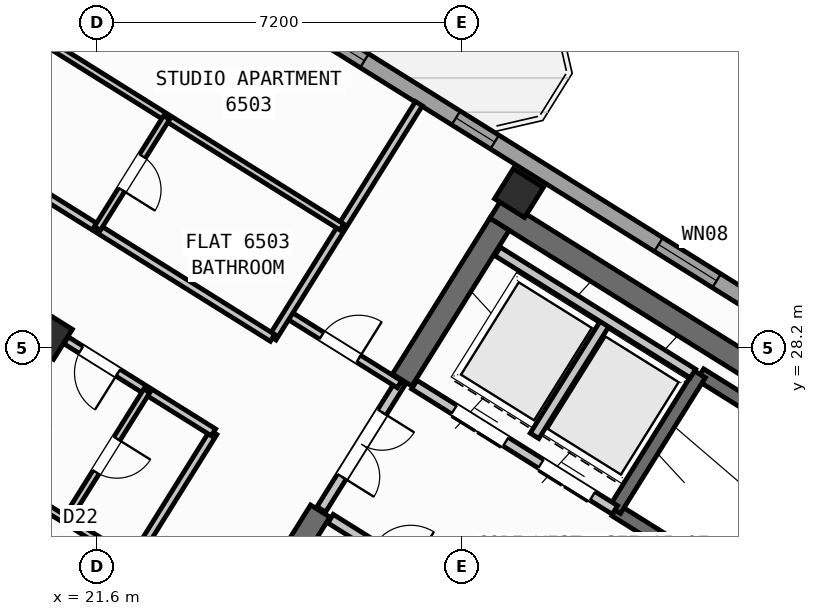
"""IFC4 building model, lengths in metres.
Left out: names, types, materials, properties, quantities, classifications, styles, units other than length and angle.
Written with IfcOpenShell. Run it as: python <this file> out.ifc"""

import sys

from ifc_helpers import new_model, si_unit, direction, frame, frame_2d, origin, origin_2d, place, context, subcontext, project, spatial, rectangle, hollow_rectangle, extrude, source, transform, mapped, element, fill, save


model = new_model("IFC4")
c1 = context("Model", 3, precision=1e-05, world=origin(), true_north=direction((0.0, 1.0)))
c2 = subcontext(c1, "Body", "Model", "MODEL_VIEW")
j1 = project(units=[si_unit("LENGTHUNIT", "METRE"), si_unit("PLANEANGLEUNIT", "RADIAN")], contexts=[c1])
p1 = place(None, origin())
s1 = spatial("IfcSite", under=j1, at=p1, CompositionType="ELEMENT")
p2 = place(p1, origin())
s2 = spatial("IfcBuilding", under=s1, at=p2, CompositionType="ELEMENT")
p3 = place(p2, frame((0.0, 0.0, 259.2)))
s3 = spatial("IfcBuildingStorey", under=s2, at=p3, CompositionType="ELEMENT", Elevation=259.2)
p4 = place(p3, frame((40.531, 24.036, 0.0), z_axis=(0.0, 0.0, 1.0), x_axis=(-0.848048787466, 0.529918157905, 0.0)))
e1 = element("IfcWall", 1, at=p4, inside=s3, PredefinedType="SHEAR", context=c2, shape_type="SweptSolid", body=[
    extrude(rectangle(XDim=13.04, YDim=0.45, at=frame_2d((6.52, 0.0))), origin(), (0.0, 0.0, 1.0), 3.35),
])
p5 = place(p3, frame((29.544, 30.636, 0.0), z_axis=(0.0, 0.0, 1.0), x_axis=(-0.529902075036, -0.848058836916, 0.0)))
e2 = element("IfcWall", 2, at=p5, inside=s3, PredefinedType="SHEAR", context=c2, shape_type="SweptSolid", body=[
    extrude(rectangle(XDim=3.625, YDim=0.45, at=frame_2d((1.812, 0.0))), origin(), (0.0, 0.0, 1.0), 3.35),
])
p6 = place(p3, frame((26.007, 24.976, 0.0), z_axis=(0.0, 0.0, 1.0), x_axis=(-0.529931155655, -0.848040665456, 0.0)))
e3 = element("IfcWall", 3, at=p6, inside=s3, PredefinedType="SHEAR", context=c2, shape_type="SweptSolid", body=[
    extrude(rectangle(XDim=6.475, YDim=0.45, at=frame_2d((3.238, 0.0))), origin(), (0.0, 0.0, 1.0), 3.35),
])
m1 = source(origin(), c2, "Body", "SweptSolid", [
    extrude(hollow_rectangle(XDim=0.7, YDim=0.7, WallThickness=0.028, at=origin_2d()), origin(), (0.0, 0.0, 1.0), 3.6),
])
for number, where, z_axis, x_axis in (
    (4, (29.928, 31.251, 0.0), (0.0, 0.0, 1.0), (-0.848, 0.53, 0.0)),
    (5, (20.632, 28.452, 0.0), (0.0, 0.0, 1.0), (-0.848, 0.53, 0.0)),
):
    element("IfcColumn", number, at=place(p3, frame(where, z_axis=z_axis, x_axis=x_axis)), inside=s3, PredefinedType="COLUMN", context=c2, shape_type="MappedRepresentation", body=[
        mapped(m1, transform((0.0, 0.0, 0.0), scale=1.0)),
    ])
p7 = place(p3, frame((14.138, 41.825, 0.0), z_axis=(0.0, 0.0, 1.0), x_axis=(0.848046498049, -0.529921821731, 0.0)))
e6 = element("IfcWall", 6, at=p7, inside=s3, PredefinedType="STANDARD", context=c2, shape_type="SweptSolid", body=[
    extrude(rectangle(XDim=31.588, YDim=0.32, at=frame_2d((15.794, 0.0))), origin(), (0.0, 0.0, 1.0), 3.35),
])
p8 = place(p7, frame((9.753, 0.0, 0.0)))
e7 = element("IfcOpeningElement", 7, at=p8, cuts=e6, PredefinedType="OPENING", context=c2, shape_type="SweptSolid", body=[
    extrude(rectangle(XDim=1.05, YDim=2.15, at=frame_2d((0.525, 1.075))), frame((0.0, 0.17, 0.0), z_axis=(0.0, -1.0, 0.0), x_axis=(1.0, 0.0, 0.0)), (0.0, 0.0, 1.0), 0.34),
])
p9 = place(p7, frame((0.816, 0.0, 0.9)))
e8 = element("IfcOpeningElement", 8, at=p9, cuts=e6, PredefinedType="OPENING", context=c2, shape_type="SweptSolid", body=[
    extrude(rectangle(XDim=1.65, YDim=1.45, at=frame_2d((0.825, 0.725))), frame((0.0, 0.17, 0.0), z_axis=(0.0, -1.0, 0.0), x_axis=(1.0, 0.0, 0.0)), (0.0, 0.0, 1.0), 0.34),
])
p10 = place(p7, frame((4.196, 0.0, 1.0)))
e9 = element("IfcOpeningElement", 9, at=p10, cuts=e6, PredefinedType="OPENING", context=c2, shape_type="SweptSolid", body=[
    extrude(rectangle(XDim=0.9, YDim=1.25, at=frame_2d((0.45, 0.625))), frame((0.0, 0.17, 0.0), z_axis=(0.0, -1.0, 0.0), x_axis=(1.0, 0.0, 0.0)), (0.0, 0.0, 1.0), 0.34),
])
p11 = place(p7, frame((7.188, 0.0, 0.95)))
e10 = element("IfcOpeningElement", 10, at=p11, cuts=e6, PredefinedType="OPENING", context=c2, shape_type="SweptSolid", body=[
    extrude(rectangle(XDim=1.95, YDim=1.35, at=frame_2d((0.975, 0.675))), frame((0.0, 0.17, 0.0), z_axis=(0.0, -1.0, 0.0), x_axis=(1.0, 0.0, 0.0)), (0.0, 0.0, 1.0), 0.34),
])
p12 = place(p7, frame((14.124, 0.0, 1.0)))
e11 = element("IfcOpeningElement", 11, at=p12, cuts=e6, PredefinedType="OPENING", context=c2, shape_type="SweptSolid", body=[
    extrude(rectangle(XDim=0.9, YDim=1.25, at=frame_2d((0.45, 0.625))), frame((0.0, 0.17, 0.0), z_axis=(0.0, -1.0, 0.0), x_axis=(1.0, 0.0, 0.0)), (0.0, 0.0, 1.0), 0.34),
])
p13 = place(p7, frame((17.154, 0.0, 1.0)))
e12 = element("IfcOpeningElement", 12, at=p13, cuts=e6, PredefinedType="OPENING", context=c2, shape_type="SweptSolid", body=[
    extrude(rectangle(XDim=0.9, YDim=1.25, at=frame_2d((0.45, 0.625))), frame((0.0, 0.17, 0.0), z_axis=(0.0, -1.0, 0.0), x_axis=(1.0, 0.0, 0.0)), (0.0, 0.0, 1.0), 0.34),
])
p14 = place(p7, frame((21.869, 0.0, 0.9)))
e13 = element("IfcOpeningElement", 13, at=p14, cuts=e6, PredefinedType="OPENING", context=c2, shape_type="SweptSolid", body=[
    extrude(rectangle(XDim=1.35, YDim=1.45, at=frame_2d((0.675, 0.725))), frame((0.0, 0.17, 0.0), z_axis=(0.0, -1.0, 0.0), x_axis=(1.0, 0.0, 0.0)), (0.0, 0.0, 1.0), 0.34),
])
p15 = place(p7, frame((27.569, 0.0, 0.9)))
e14 = element("IfcOpeningElement", 14, at=p15, cuts=e6, PredefinedType="OPENING", context=c2, shape_type="SweptSolid", body=[
    extrude(rectangle(XDim=1.35, YDim=1.45, at=frame_2d((0.675, 0.725))), frame((0.0, 0.17, 0.0), z_axis=(0.0, -1.0, 0.0), x_axis=(1.0, 0.0, 0.0)), (0.0, 0.0, 1.0), 0.34),
])
p16 = place(p3, frame((39.721, 23.788, 0.0), z_axis=(0.0, 0.0, 1.0), x_axis=(-0.848054434086, 0.529909121291, 0.0)))
e15 = element("IfcWall", 15, at=p16, inside=s3, PredefinedType="SHEAR", context=c2, shape_type="SweptSolid", body=[
    extrude(rectangle(XDim=7.33, YDim=0.26, at=frame_2d((3.665, 0.0))), origin(), (0.0, 0.0, 1.0), 3.35),
])
p17 = place(p3, frame((38.046, 21.108, 0.0), z_axis=(0.0, 0.0, 1.0), x_axis=(-0.848054434086, 0.529909121291, 0.0)))
e16 = element("IfcWall", 16, at=p17, inside=s3, PredefinedType="SHEAR", context=c2, shape_type="SweptSolid", body=[
    extrude(rectangle(XDim=7.33, YDim=0.26, at=frame_2d((3.665, 0.0))), origin(), (0.0, 0.0, 1.0), 3.35),
])
p18 = place(p17, frame((0.22, 0.0, 0.0)))
e17 = element("IfcOpeningElement", 17, at=p18, cuts=e16, PredefinedType="OPENING", context=c2, shape_type="SweptSolid", body=[
    extrude(rectangle(XDim=1.1, YDim=2.1, at=frame_2d((0.55, 1.05))), frame((0.0, 0.14, 0.0), z_axis=(0.0, -1.0, 0.0), x_axis=(1.0, 0.0, 0.0)), (0.0, 0.0, 1.0), 0.28),
])
p19 = place(p3, frame((33.496, 27.677, 0.0), z_axis=(0.0, 0.0, 1.0), x_axis=(-0.529908658664, -0.84805472316, 0.0)))
e18 = element("IfcWall", 18, at=p19, inside=s3, PredefinedType="SHEAR", context=c2, shape_type="SweptSolid", body=[
    extrude(rectangle(XDim=3.16, YDim=0.26, at=frame_2d((1.58, 0.0))), origin(), (0.0, 0.0, 1.0), 3.35),
])
p20 = place(p3, frame((31.822, 24.998, 0.0), z_axis=(0.0, 0.0, 1.0), x_axis=(-0.848054125777, 0.529909614701, 0.0)))
e19 = element("IfcWall", 19, at=p20, inside=s3, PredefinedType="STANDARD", context=c2, shape_type="SweptSolid", body=[
    extrude(rectangle(XDim=4.668, YDim=0.2, at=frame_2d((2.334, 0.0))), origin(), (0.0, 0.0, 1.0), 3.34),
])
p21 = place(p20, frame((0.52, 0.0, 0.0)))
e20 = element("IfcOpeningElement", 20, at=p21, cuts=e19, PredefinedType="OPENING", context=c2, shape_type="SweptSolid", body=[
    extrude(rectangle(XDim=1.2, YDim=2.15, at=frame_2d((0.6, 1.075))), frame((0.0, 0.11, 0.0), z_axis=(0.0, -1.0, 0.0), x_axis=(1.0, 0.0, 0.0)), (0.0, 0.0, 1.0), 0.22),
])
p22 = place(p20, frame((2.54, 0.0, 0.0)))
e21 = element("IfcOpeningElement", 21, at=p22, cuts=e19, PredefinedType="OPENING", context=c2, shape_type="SweptSolid", body=[
    extrude(rectangle(XDim=1.2, YDim=2.15, at=frame_2d((0.6, 1.075))), frame((0.0, 0.11, 0.0), z_axis=(0.0, -1.0, 0.0), x_axis=(1.0, 0.0, 0.0)), (0.0, 0.0, 1.0), 0.22),
])
p23 = place(p3, frame((31.645, 28.716, 0.0), z_axis=(0.0, 0.0, 1.0), x_axis=(-0.52986693015, -0.848080795876, 0.0)))
e22 = element("IfcWall", 22, at=p23, inside=s3, PredefinedType="STANDARD", context=c2, shape_type="SweptSolid", body=[
    extrude(rectangle(XDim=2.66, YDim=0.2, at=frame_2d((1.33, 0.0))), origin(), (0.0, 0.0, 1.0), 3.34),
])
p24 = place(p3, frame((33.363, 27.69, 0.0), z_axis=(0.0, 0.0, 1.0), x_axis=(-0.84804957148, 0.529916903215, 0.0)))
e23 = element("IfcWall", 23, at=p24, inside=s3, PredefinedType="STANDARD", context=c2, shape_type="SweptSolid", body=[
    extrude(rectangle(XDim=4.548, YDim=0.2, at=frame_2d((2.274, 0.0))), origin(), (0.0, 0.0, 1.0), 3.34),
])
p25 = place(p3, frame((31.525, 21.504, 0.0), z_axis=(0.0, 0.0, 1.0), x_axis=(-0.848042066329, 0.529928913853, 0.0)))
e24 = element("IfcWall", 24, at=p25, inside=s3, PredefinedType="STANDARD", context=c2, shape_type="SweptSolid", body=[
    extrude(rectangle(XDim=6.268, YDim=0.2, at=frame_2d((3.134, 0.0))), origin(), (0.0, 0.0, 1.0), 3.34),
])
p26 = place(p25, frame((4.4, 0.0, 0.0)))
e25 = element("IfcOpeningElement", 25, at=p26, cuts=e24, PredefinedType="OPENING", context=c2, shape_type="SweptSolid", body=[
    extrude(rectangle(XDim=0.86, YDim=2.05, at=frame_2d((0.43, 1.025))), frame((0.0, 0.11, 0.0), z_axis=(0.0, -1.0, 0.0), x_axis=(1.0, 0.0, 0.0)), (0.0, 0.0, 1.0), 0.22),
])
p27 = place(p25, frame((0.35, 0.0, 0.0)))
e26 = element("IfcOpeningElement", 26, at=p27, cuts=e24, PredefinedType="OPENING", context=c2, shape_type="SweptSolid", body=[
    extrude(rectangle(XDim=0.86, YDim=2.05, at=frame_2d((0.43, 1.025))), frame((0.0, 0.11, 0.0), z_axis=(0.0, -1.0, 0.0), x_axis=(1.0, 0.0, 0.0)), (0.0, 0.0, 1.0), 0.22),
])
p28 = place(p3, frame((27.596, 27.52, 0.0), z_axis=(0.0, 0.0, 1.0), x_axis=(-0.529865479138, -0.848081702443, 0.0)))
e27 = element("IfcWall", 27, at=p28, inside=s3, PredefinedType="STANDARD", context=c2, shape_type="SweptSolid", body=[
    extrude(rectangle(XDim=2.96, YDim=0.2, at=frame_2d((1.48, 0.0))), origin(), (0.0, 0.0, 1.0), 3.34),
])
p29 = place(p28, frame((0.7, 0.0, 0.0)))
e28 = element("IfcOpeningElement", 28, at=p29, cuts=e27, PredefinedType="OPENING", context=c2, shape_type="SweptSolid", body=[
    extrude(rectangle(XDim=1.5, YDim=2.15, at=frame_2d((0.75, 1.075))), frame((0.0, 0.11, 0.0), z_axis=(0.0, -1.0, 0.0), x_axis=(1.0, 0.0, 0.0)), (0.0, 0.0, 1.0), 0.22),
])
p30 = place(p3, frame((27.57, 27.478, 0.0), z_axis=(0.0, 0.0, 1.0), x_axis=(-0.848050851465, 0.529914854792, 0.0)))
e29 = element("IfcWall", 29, at=p30, inside=s3, PredefinedType="PARTITIONING", context=c2, shape_type="SweptSolid", body=[
    extrude(rectangle(XDim=2.61, YDim=0.16, at=frame_2d((1.305, 0.0))), origin(), (0.0, 0.0, 1.0), 3.34),
])
p31 = place(p30, frame((0.95, 0.0, 0.0)))
e30 = element("IfcOpeningElement", 30, at=p31, cuts=e29, PredefinedType="OPENING", context=c2, shape_type="SweptSolid", body=[
    extrude(rectangle(XDim=0.86, YDim=2.05, at=frame_2d((0.43, 1.025))), frame((0.0, 0.09, 0.0), z_axis=(0.0, -1.0, 0.0), x_axis=(1.0, 0.0, 0.0)), (0.0, 0.0, 1.0), 0.18),
])
p32 = place(p3, frame((27.953, 33.016, 0.0), z_axis=(0.0, 0.0, 1.0), x_axis=(-0.529906322364, -0.848056182997, 0.0)))
e31 = element("IfcWall", 31, at=p32, inside=s3, PredefinedType="PARTITIONING", context=c2, shape_type="SweptSolid", body=[
    extrude(rectangle(XDim=5.45, YDim=0.16, at=frame_2d((2.725, 0.0))), origin(), (0.0, 0.0, 1.0), 3.34),
])
p33 = place(p3, frame((23.899, 26.529, 0.0), z_axis=(0.0, 0.0, 1.0), x_axis=(-0.529917716469, -0.848049063305, 0.0)))
e32 = element("IfcWall", 32, at=p33, inside=s3, PredefinedType="PARTITIONING", context=c2, shape_type="SweptSolid", body=[
    extrude(rectangle(XDim=14.05, YDim=0.16, at=frame_2d((7.025, 0.0))), origin(), (0.0, 0.0, 1.0), 3.34),
])
p34 = place(p3, frame((25.065, 28.394, 0.0), z_axis=(0.0, 0.0, 1.0), x_axis=(-0.848048310262, 0.529918921593, 0.0)))
e33 = element("IfcWall", 33, at=p34, inside=s3, PredefinedType="PARTITIONING", context=c2, shape_type="SweptSolid", body=[
    extrude(rectangle(XDim=16.73, YDim=0.16, at=frame_2d((8.365, 0.0))), origin(), (0.0, 0.0, 1.0), 3.34),
])
p35 = place(p34, frame((6.683, 0.0, 0.0)))
e34 = element("IfcOpeningElement", 34, at=p35, cuts=e33, PredefinedType="OPENING", context=c2, shape_type="SweptSolid", body=[
    extrude(rectangle(XDim=1.0, YDim=2.1, at=frame_2d((0.5, 1.05))), frame((0.0, 0.09, 0.0), z_axis=(0.0, -1.0, 0.0), x_axis=(1.0, 0.0, 0.0)), (0.0, 0.0, 1.0), 0.18),
])
p36 = place(p34, frame((11.14, 0.0, 0.0)))
e35 = element("IfcOpeningElement", 35, at=p36, cuts=e33, PredefinedType="OPENING", context=c2, shape_type="SweptSolid", body=[
    extrude(rectangle(XDim=1.0, YDim=2.1, at=frame_2d((0.5, 1.05))), frame((0.0, 0.09, 0.0), z_axis=(0.0, -1.0, 0.0), x_axis=(1.0, 0.0, 0.0)), (0.0, 0.0, 1.0), 0.18),
])
p37 = place(p3, frame((23.899, 26.529, 0.0), z_axis=(0.0, 0.0, 1.0), x_axis=(-0.84807831592, 0.529870899433, 0.0)))
e36 = element("IfcWall", 36, at=p37, inside=s3, PredefinedType="PARTITIONING", context=c2, shape_type="SweptSolid", body=[
    extrude(rectangle(XDim=3.428, YDim=0.16, at=frame_2d((1.714, 0.0))), origin(), (0.0, 0.0, 1.0), 2.875),
])
p38 = place(p37, frame((2.22, 0.0, 0.0)))
e37 = element("IfcOpeningElement", 37, at=p38, cuts=e36, PredefinedType="OPENING", context=c2, shape_type="SweptSolid", body=[
    extrude(rectangle(XDim=0.86, YDim=2.05, at=frame_2d((0.43, 1.025))), frame((0.0, 0.09, 0.0), z_axis=(0.0, -1.0, 0.0), x_axis=(1.0, 0.0, 0.0)), (0.0, 0.0, 1.0), 0.18),
])
p39 = place(p3, frame((22.304, 23.976, 0.0), z_axis=(0.0, 0.0, 1.0), x_axis=(-0.84803087207, 0.529946827537, 0.0)))
e38 = element("IfcWall", 38, at=p39, inside=s3, PredefinedType="PLUMBINGWALL", context=c2, shape_type="SweptSolid", body=[
    extrude(rectangle(XDim=3.79, YDim=0.14, at=frame_2d((1.895, 0.0))), origin(), (0.0, 0.0, 1.0), 3.34),
])
p40 = place(p39, frame((2.23, 0.0, 0.0)))
e39 = element("IfcOpeningElement", 39, at=p40, cuts=e38, PredefinedType="OPENING", context=c2, shape_type="SweptSolid", body=[
    extrude(rectangle(XDim=0.92, YDim=2.08, at=frame_2d((0.46, 1.04))), frame((0.0, 0.08, 0.0), z_axis=(0.0, -1.0, 0.0), x_axis=(1.0, 0.0, 0.0)), (0.0, 0.0, 1.0), 0.16),
])
p41 = place(p3, frame((22.585, 27.35, 0.0), z_axis=(0.0, 0.0, 1.0), x_axis=(-0.529977067289, -0.848011974059, 0.0)))
e40 = element("IfcWall", 40, at=p41, inside=s3, PredefinedType="PLUMBINGWALL", context=c2, shape_type="SweptSolid", body=[
    extrude(rectangle(XDim=3.01, YDim=0.14, at=frame_2d((1.505, 0.0))), origin(), (0.0, 0.0, 1.0), 3.025),
])
p42 = place(p41, frame((1.115, 0.0, 0.0)))
e41 = element("IfcOpeningElement", 41, at=p42, cuts=e40, PredefinedType="OPENING", context=c2, shape_type="SweptSolid", body=[
    extrude(rectangle(XDim=0.78, YDim=2.05, at=frame_2d((0.39, 1.025))), frame((0.0, 0.08, 0.0), z_axis=(0.0, -1.0, 0.0), x_axis=(1.0, 0.0, 0.0)), (0.0, 0.0, 1.0), 0.16),
])
p43 = place(p3, frame((26.432, 30.582, 0.0), z_axis=(0.0, 0.0, 1.0), x_axis=(-0.848057523537, 0.529904176971, 0.0)))
e42 = element("IfcWall", 42, at=p43, inside=s3, PredefinedType="PLUMBINGWALL", context=c2, shape_type="SweptSolid", body=[
    extrude(rectangle(XDim=10.19, YDim=0.14, at=frame_2d((5.095, 0.0))), origin(), (0.0, 0.0, 1.0), 3.34),
])
p44 = place(p43, frame((6.693, 0.0, 0.0)))
e43 = element("IfcOpeningElement", 43, at=p44, cuts=e42, PredefinedType="OPENING", context=c2, shape_type="SweptSolid", body=[
    extrude(rectangle(XDim=0.92, YDim=2.08, at=frame_2d((0.46, 1.04))), frame((0.0, 0.08, 0.0), z_axis=(0.0, -1.0, 0.0), x_axis=(1.0, 0.0, 0.0)), (0.0, 0.0, 1.0), 0.16),
])
p45 = place(p3, frame((22.976, 32.742, 0.0), z_axis=(0.0, 0.0, 1.0), x_axis=(-0.529913878929, -0.848051461244, 0.0)))
e44 = element("IfcWall", 44, at=p45, inside=s3, PredefinedType="PLUMBINGWALL", context=c2, shape_type="SweptSolid", body=[
    extrude(rectangle(XDim=2.58, YDim=0.14, at=frame_2d((1.29, 0.0))), origin(), (0.0, 0.0, 1.0), 3.34),
])
p46 = place(p45, frame((0.9, 0.0, 0.0)))
e45 = element("IfcOpeningElement", 45, at=p46, cuts=e44, PredefinedType="OPENING", context=c2, shape_type="SweptSolid", body=[
    extrude(rectangle(XDim=0.78, YDim=2.05, at=frame_2d((0.39, 1.025))), frame((0.0, 0.08, 0.0), z_axis=(0.0, -1.0, 0.0), x_axis=(1.0, 0.0, 0.0)), (0.0, 0.0, 1.0), 0.16),
])
m2 = source(origin(), c2, "Body", "SweptSolid", [
    extrude(rectangle(XDim=0.9, YDim=1.25, at=frame_2d((0.45, 0.625))), frame((0.0, 0.03, 0.0), z_axis=(0.0, -1.0, 0.0), x_axis=(1.0, 0.0, 0.0)), (0.0, 0.0, 1.0), 0.06),
])
p47 = place(p12, origin())
e46 = element("IfcWindow", 46, at=p47, inside=s3, PartitioningType="SINGLE_PANEL", PredefinedType="WINDOW", context=c2, shape_type="MappedRepresentation", body=[
    mapped(m2, transform((0.0, 0.0, 0.0), scale=1.0)),
])
fill(e11, e46)
p48 = place(p13, origin())
e47 = element("IfcWindow", 47, at=p48, inside=s3, PartitioningType="SINGLE_PANEL", PredefinedType="WINDOW", context=c2, shape_type="MappedRepresentation", body=[
    mapped(m2, transform((0.0, 0.0, 0.0), scale=1.0)),
])
fill(e12, e47)
m3 = source(origin(), c2, "Body", "SweptSolid", [
    extrude(rectangle(XDim=1.35, YDim=1.45, at=frame_2d((0.675, 0.725))), frame((0.0, 0.03, 0.0), z_axis=(0.0, -1.0, 0.0), x_axis=(1.0, 0.0, 0.0)), (0.0, 0.0, 1.0), 0.06),
])
p49 = place(p14, origin())
e48 = element("IfcWindow", 48, at=p49, inside=s3, PartitioningType="SINGLE_PANEL", PredefinedType="WINDOW", context=c2, shape_type="MappedRepresentation", body=[
    mapped(m3, transform((0.0, 0.0, 0.0), scale=1.0)),
])
fill(e13, e48)
m4 = source(origin(), c2, "Body", "SweptSolid", [
    extrude(rectangle(XDim=1.2, YDim=2.15, at=frame_2d((0.6, 1.075))), frame((0.0, 0.025, 0.0), z_axis=(0.0, -1.0, 0.0), x_axis=(1.0, 0.0, 0.0)), (0.0, 0.0, 1.0), 0.05),
])
p50 = place(p21, origin())
e49 = element("IfcDoor", 49, at=p50, inside=s3, OperationType="DOUBLE_DOOR_SLIDING", PredefinedType="DOOR", context=c2, shape_type="MappedRepresentation", body=[
    mapped(m4, transform((0.0, 0.0, 0.0), scale=1.0)),
])
fill(e20, e49)
p51 = place(p22, origin())
e50 = element("IfcDoor", 50, at=p51, inside=s3, OperationType="DOUBLE_DOOR_SLIDING", PredefinedType="DOOR", context=c2, shape_type="MappedRepresentation", body=[
    mapped(m4, transform((0.0, 0.0, 0.0), scale=1.0)),
])
fill(e21, e50)
m5 = source(origin(), c2, "Body", "SweptSolid", [
    extrude(rectangle(XDim=0.86, YDim=2.05, at=frame_2d((0.43, 1.025))), frame((0.0, 0.025, 0.0), z_axis=(0.0, -1.0, 0.0), x_axis=(1.0, 0.0, 0.0)), (0.0, 0.0, 1.0), 0.05),
])
p52 = place(p31, frame((0.86, 0.0, 0.0), z_axis=(0.0, 0.0, 1.0), x_axis=(-1.0, 0.0, 0.0)))
e51 = element("IfcDoor", 51, at=p52, inside=s3, OperationType="SINGLE_SWING_RIGHT", PredefinedType="DOOR", context=c2, shape_type="MappedRepresentation", body=[
    mapped(m5, transform((0.0, 0.0, 0.0), scale=1.0)),
])
fill(e30, e51)
m6 = source(origin(), c2, "Body", "SweptSolid", [
    extrude(rectangle(XDim=1.5, YDim=2.15, at=frame_2d((0.75, 1.075))), frame((0.0, 0.025, 0.0), z_axis=(0.0, -1.0, 0.0), x_axis=(1.0, 0.0, 0.0)), (0.0, 0.0, 1.0), 0.05),
])
p53 = place(p29, origin())
e52 = element("IfcDoor", 52, at=p53, inside=s3, OperationType="DOUBLE_DOOR_SINGLE_SWING", PredefinedType="DOOR", context=c2, shape_type="MappedRepresentation", body=[
    mapped(m6, transform((0.0, 0.0, 0.0), scale=1.0)),
])
fill(e28, e52)
p54 = place(p38, origin())
e53 = element("IfcDoor", 53, at=p54, inside=s3, OperationType="SINGLE_SWING_LEFT", PredefinedType="DOOR", context=c2, shape_type="MappedRepresentation", body=[
    mapped(m5, transform((0.0, 0.0, 0.0), scale=1.0)),
])
fill(e37, e53)
m7 = source(origin(), c2, "Body", "SweptSolid", [
    extrude(rectangle(XDim=0.78, YDim=2.05, at=frame_2d((0.39, 1.025))), frame((0.0, 0.025, 0.0), z_axis=(0.0, -1.0, 0.0), x_axis=(1.0, 0.0, 0.0)), (0.0, 0.0, 1.0), 0.05),
])
p55 = place(p42, origin())
e54 = element("IfcDoor", 54, at=p55, inside=s3, OperationType="SINGLE_SWING_LEFT", PredefinedType="DOOR", context=c2, shape_type="MappedRepresentation", body=[
    mapped(m7, transform((0.0, 0.0, 0.0), scale=1.0)),
])
fill(e41, e54)
p56 = place(p46, origin())
e55 = element("IfcDoor", 55, at=p56, inside=s3, OperationType="SINGLE_SWING_RIGHT", PredefinedType="DOOR", context=c2, shape_type="MappedRepresentation", body=[
    mapped(m7, transform((0.0, 0.0, 0.0), scale=1.0)),
])
fill(e45, e55)
save(model, sys.argv[1])
